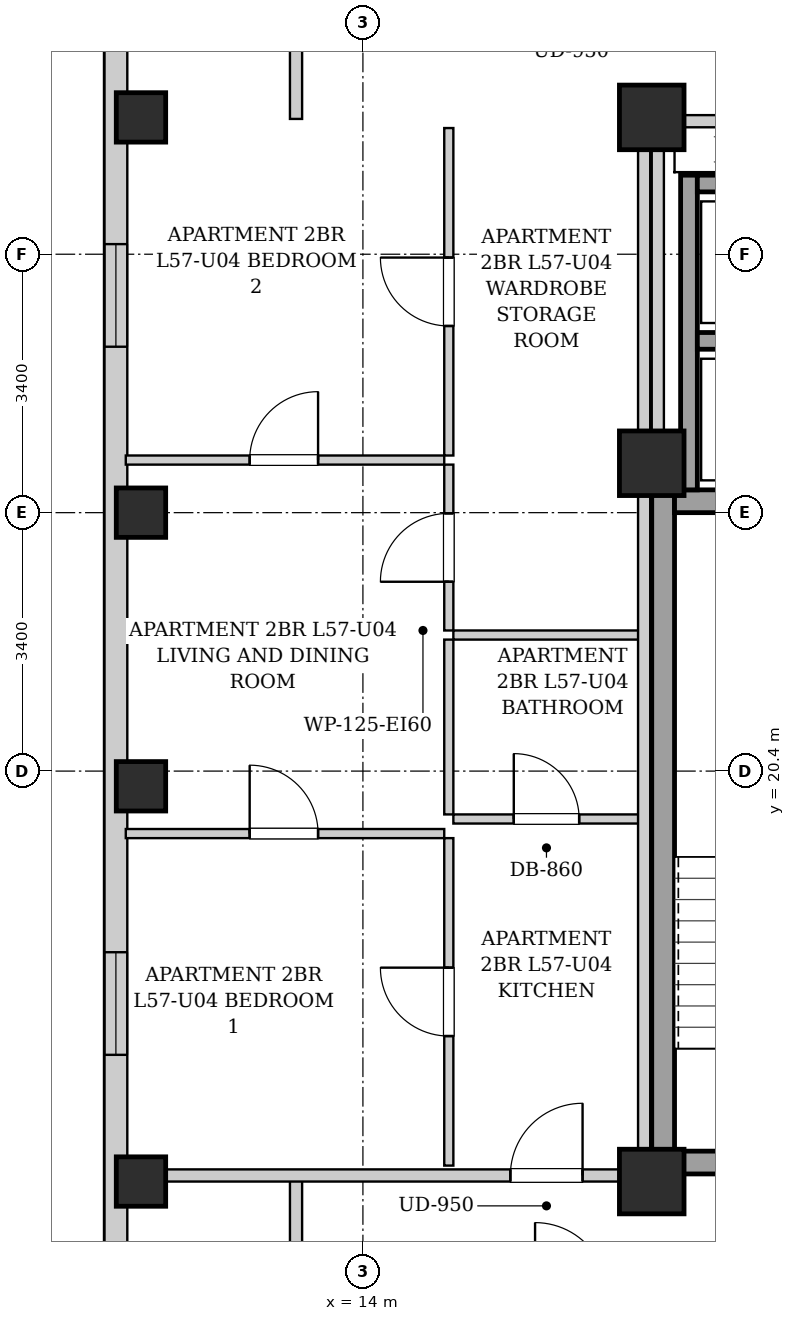
"""IFC4 building model, lengths in metres.
Left out: names, types, materials, properties, quantities, classifications, styles, units other than length and angle.
Written with IfcOpenShell. Run it as: python <this file> out.ifc"""

import sys

from ifc_helpers import new_model, si_unit, direction, frame, frame_2d, origin, origin_2d, place, context, subcontext, project, spatial, rectangle, extrude, element, fill, save


model = new_model("IFC4")
c1 = context("Model", 3, precision=1e-05, world=origin(), true_north=direction((0.0, 1.0)))
c2 = subcontext(c1, "Body", "Model", "MODEL_VIEW")
j1 = project(units=[si_unit("LENGTHUNIT", "METRE"), si_unit("PLANEANGLEUNIT", "RADIAN")], contexts=[c1])
p1 = place(None, origin())
s1 = spatial("IfcSite", under=j1, at=p1, CompositionType="ELEMENT")
p2 = place(p1, origin())
s2 = spatial("IfcBuilding", under=s1, at=p2, CompositionType="ELEMENT")
p3 = place(p2, frame((0.0, 0.0, 197.5)))
s3 = spatial("IfcBuildingStorey", under=s2, at=p3, CompositionType="ELEMENT", Elevation=197.5)
for number, where, z_axis, x_axis in (
    (1, (11.08, 15.0, 0.0), (0.0, 0.0, 1.0), (1.0, 0.0, 0.0)),
    (2, (11.08, 20.2, 0.0), (0.0, 0.0, 1.0), (1.0, 0.0, 0.0)),
    (3, (11.08, 23.8, 0.0), (0.0, 0.0, 1.0), (1.0, 0.0, 0.0)),
    (4, (11.08, 29.0, 0.0), (0.0, 0.0, 1.0), (1.0, 0.0, 0.0)),
):
    element("IfcColumn", number, at=place(p3, frame(where, z_axis=z_axis, x_axis=x_axis)), inside=s3, PredefinedType="COLUMN", context=c2, shape_type="SweptSolid", body=[
        extrude(rectangle(XDim=0.65, YDim=0.65, at=origin_2d()), origin(), (0.0, 0.0, 1.0), 3.3),
    ])
for number, where, z_axis, x_axis in (
    (5, (17.8, 15.0, 0.0), (0.0, 0.0, 1.0), (1.0, 0.0, 0.0)),
    (6, (17.8, 29.0, 0.0), (0.0, 0.0, 1.0), (1.0, 0.0, 0.0)),
    (7, (17.8, 24.45, 0.0), (0.0, 0.0, 1.0), (1.0, 0.0, 0.0)),
):
    element("IfcColumn", number, at=place(p3, frame(where, z_axis=z_axis, x_axis=x_axis)), inside=s3, PredefinedType="COLUMN", context=c2, shape_type="SweptSolid", body=[
        extrude(rectangle(XDim=0.85, YDim=0.85, at=origin_2d()), origin(), (0.0, 0.0, 1.0), 3.3),
    ])
p4 = place(p3, frame((10.75, 6.3, 0.0), z_axis=(0.0, 0.0, 1.0), x_axis=(0.0, 1.0, 0.0)))
e8 = element("IfcWall", 8, at=p4, inside=s3, PredefinedType="SOLIDWALL", context=c2, shape_type="SweptSolid", body=[
    extrude(rectangle(XDim=31.4, YDim=0.3, at=frame_2d((15.7, 0.0))), origin(), (0.0, 0.0, 1.0), 3.04),
])
p5 = place(p4, frame((1.653, 0.0, 0.55)))
e9 = element("IfcOpeningElement", 9, at=p5, cuts=e8, PredefinedType="OPENING", context=c2, shape_type="SweptSolid", body=[
    extrude(rectangle(XDim=1.35, YDim=1.2, at=frame_2d((0.675, 0.6))), frame((0.0, 0.16, 0.0), z_axis=(0.0, -1.0, 0.0), x_axis=(1.0, 0.0, 0.0)), (0.0, 0.0, 1.0), 0.32),
])
p6 = place(p4, frame((28.396, 0.0, 0.55)))
e10 = element("IfcOpeningElement", 10, at=p6, cuts=e8, PredefinedType="OPENING", context=c2, shape_type="SweptSolid", body=[
    extrude(rectangle(XDim=1.35, YDim=1.2, at=frame_2d((0.675, 0.6))), frame((0.0, 0.16, 0.0), z_axis=(0.0, -1.0, 0.0), x_axis=(1.0, 0.0, 0.0)), (0.0, 0.0, 1.0), 0.32),
])
p7 = place(p4, frame((10.367, 0.0, 0.55)))
e11 = element("IfcOpeningElement", 11, at=p7, cuts=e8, PredefinedType="OPENING", context=c2, shape_type="SweptSolid", body=[
    extrude(rectangle(XDim=1.35, YDim=1.2, at=frame_2d((0.675, 0.6))), frame((0.0, 0.16, 0.0), z_axis=(0.0, -1.0, 0.0), x_axis=(1.0, 0.0, 0.0)), (0.0, 0.0, 1.0), 0.32),
])
p8 = place(p4, frame((19.683, 0.0, 0.55)))
e12 = element("IfcOpeningElement", 12, at=p8, cuts=e8, PredefinedType="OPENING", context=c2, shape_type="SweptSolid", body=[
    extrude(rectangle(XDim=1.35, YDim=1.2, at=frame_2d((0.675, 0.6))), frame((0.0, 0.16, 0.0), z_axis=(0.0, -1.0, 0.0), x_axis=(1.0, 0.0, 0.0)), (0.0, 0.0, 1.0), 0.32),
])
p9 = place(p3, frame((17.95, 15.1, 0.0), z_axis=(0.0, 0.0, 1.0), x_axis=(0.0, 1.0, 0.0)))
e13 = element("IfcWall", 13, at=p9, inside=s3, PredefinedType="SHEAR", context=c2, shape_type="SweptSolid", body=[
    extrude(rectangle(XDim=9.0, YDim=0.3, at=frame_2d((4.5, 0.0))), origin(), (0.0, 0.0, 1.0), 3.04),
])
p10 = place(p3, frame((18.1, 23.95, 0.0), z_axis=(0.0, 0.0, 1.0), x_axis=(1.0, 0.0, 0.0)))
e14 = element("IfcWall", 14, at=p10, inside=s3, PredefinedType="SHEAR", context=c2, shape_type="SweptSolid", body=[
    extrude(rectangle(XDim=2.85, YDim=0.3, at=frame_2d((1.425, 0.0))), origin(), (0.0, 0.0, 1.0), 3.04),
])
p11 = place(p3, frame((18.1, 15.25, 0.0), z_axis=(0.0, 0.0, 1.0), x_axis=(1.0, 0.0, 0.0)))
e15 = element("IfcWall", 15, at=p11, inside=s3, PredefinedType="SHEAR", context=c2, shape_type="SweptSolid", body=[
    extrude(rectangle(XDim=2.85, YDim=0.3, at=frame_2d((1.425, 0.0))), origin(), (0.0, 0.0, 1.0), 3.04),
])
p12 = place(p11, frame((0.86, 0.0, 0.0)))
e16 = element("IfcOpeningElement", 16, at=p12, cuts=e15, PredefinedType="OPENING", context=c2, shape_type="SweptSolid", body=[
    extrude(rectangle(XDim=1.1, YDim=2.05, at=frame_2d((0.55, 1.025))), frame((0.0, 0.16, 0.0), z_axis=(0.0, -1.0, 0.0), x_axis=(1.0, 0.0, 0.0)), (0.0, 0.0, 1.0), 0.32),
])
p13 = place(p3, frame((18.29, 24.1, 0.0), z_axis=(0.0, 0.0, 1.0), x_axis=(0.0, 1.0, 0.0)))
e17 = element("IfcWall", 17, at=p13, inside=s3, PredefinedType="SHEAR", context=c2, shape_type="SweptSolid", body=[
    extrude(rectangle(XDim=4.14, YDim=0.22, at=frame_2d((2.07, 0.0))), origin(), (0.0, 0.0, 1.0), 3.04),
])
for number, where, z_axis, x_axis in (
    (18, (18.4, 26.06, 0.0), (0.0, 0.0, 1.0), (1.0, 0.0, 0.0)),
    (19, (18.4, 28.13, 0.0), (0.0, 0.0, 1.0), (1.0, 0.0, 0.0)),
):
    element("IfcWall", number, at=place(p3, frame(where, z_axis=z_axis, x_axis=x_axis)), inside=s3, PredefinedType="SHEAR", context=c2, shape_type="SweptSolid", body=[
        extrude(rectangle(XDim=1.9, YDim=0.22, at=frame_2d((0.95, 0.0))), origin(), (0.0, 0.0, 1.0), 3.04),
    ])
p14 = place(p3, frame((17.88, 24.12, 0.0), z_axis=(0.0, 0.0, 1.0), x_axis=(0.0, 1.0, 0.0)))
e20 = element("IfcWall", 20, at=p14, inside=s3, PredefinedType="PARTITIONING", context=c2, shape_type="SweptSolid", body=[
    extrude(rectangle(XDim=4.76, YDim=0.16, at=frame_2d((2.38, 0.0))), origin(), (0.0, 0.0, 1.0), 2.375),
])
p15 = place(p3, frame((17.96, 28.95, 0.0), z_axis=(0.0, 0.0, 1.0), x_axis=(1.0, 0.0, 0.0)))
e21 = element("IfcWall", 21, at=p15, inside=s3, PredefinedType="PARTITIONING", context=c2, shape_type="SweptSolid", body=[
    extrude(rectangle(XDim=4.29, YDim=0.16, at=frame_2d((2.145, 0.0))), origin(), (0.0, 0.0, 1.0), 2.556),
])
p16 = place(p15, frame((1.715, 0.0, 0.0)))
e22 = element("IfcOpeningElement", 22, at=p16, cuts=e21, PredefinedType="OPENING", context=c2, shape_type="SweptSolid", body=[
    extrude(rectangle(XDim=0.86, YDim=2.05, at=frame_2d((0.43, 1.025))), frame((0.0, 0.09, 0.0), z_axis=(0.0, -1.0, 0.0), x_axis=(1.0, 0.0, 0.0)), (0.0, 0.0, 1.0), 0.18),
])
for number, where, z_axis, x_axis in (
    (23, (13.12, 13.51, 0.0), (0.0, 0.0, 1.0), (0.0, 1.0, 0.0)),
    (24, (13.12, 28.98, 0.0), (0.0, 0.0, 1.0), (0.0, 1.0, 0.0)),
):
    element("IfcWall", number, at=place(p3, frame(where, z_axis=z_axis, x_axis=x_axis)), inside=s3, PredefinedType="PARTITIONING", context=c2, shape_type="SweptSolid", body=[
        extrude(rectangle(XDim=1.58, YDim=0.16, at=frame_2d((0.79, 0.0))), origin(), (0.0, 0.0, 1.0), 3.04),
    ])
p17 = place(p3, frame((10.88, 15.08, 0.0), z_axis=(0.0, 0.0, 1.0), x_axis=(1.0, 0.0, 0.0)))
e25 = element("IfcWall", 25, at=p17, inside=s3, PredefinedType="PARTITIONING", context=c2, shape_type="SweptSolid", body=[
    extrude(rectangle(XDim=6.88, YDim=0.16, at=frame_2d((3.44, 0.0))), origin(), (0.0, 0.0, 1.0), 2.556),
])
p18 = place(p17, frame((5.06, 0.0, 0.0)))
e26 = element("IfcOpeningElement", 26, at=p18, cuts=e25, PredefinedType="OPENING", context=c2, shape_type="SweptSolid", body=[
    extrude(rectangle(XDim=0.95, YDim=2.1, at=frame_2d((0.475, 1.05))), frame((0.0, 0.09, 0.0), z_axis=(0.0, -1.0, 0.0), x_axis=(1.0, 0.0, 0.0)), (0.0, 0.0, 1.0), 0.18),
])
p19 = place(p3, frame((15.19, 22.19, 0.0), z_axis=(0.0, 0.0, 1.0), x_axis=(1.0, 0.0, 0.0)))
e27 = element("IfcWall", 27, at=p19, inside=s3, PredefinedType="PARTITIONING", context=c2, shape_type="SweptSolid", body=[
    extrude(rectangle(XDim=2.45, YDim=0.12, at=frame_2d((1.225, 0.0))), origin(), (0.0, 0.0, 1.0), 3.04),
])
p20 = place(p3, frame((15.13, 22.25, 0.0), z_axis=(0.0, 0.0, 1.0), x_axis=(0.0, 1.0, 0.0)))
e28 = element("IfcWall", 28, at=p20, inside=s3, PredefinedType="PARTITIONING", context=c2, shape_type="SweptSolid", body=[
    extrude(rectangle(XDim=2.182, YDim=0.12, at=frame_2d((1.091, 0.0))), origin(), (0.0, 0.0, 1.0), 3.04),
])
p21 = place(p20, frame((0.641, 0.0, 0.0)))
e29 = element("IfcOpeningElement", 29, at=p21, cuts=e28, PredefinedType="OPENING", context=c2, shape_type="SweptSolid", body=[
    extrude(rectangle(XDim=0.9, YDim=2.05, at=frame_2d((0.45, 1.025))), frame((0.0, 0.07, 0.0), z_axis=(0.0, -1.0, 0.0), x_axis=(1.0, 0.0, 0.0)), (0.0, 0.0, 1.0), 0.14),
])
p22 = place(p3, frame((15.13, 24.552, 0.0), z_axis=(0.0, 0.0, 1.0), x_axis=(0.0, 1.0, 0.0)))
e30 = element("IfcWall", 30, at=p22, inside=s3, PredefinedType="PARTITIONING", context=c2, shape_type="SweptSolid", body=[
    extrude(rectangle(XDim=4.308, YDim=0.12, at=frame_2d((2.154, 0.0))), origin(), (0.0, 0.0, 1.0), 3.04),
])
p23 = place(p22, frame((1.704, 0.0, 0.0)))
e31 = element("IfcOpeningElement", 31, at=p23, cuts=e30, PredefinedType="OPENING", context=c2, shape_type="SweptSolid", body=[
    extrude(rectangle(XDim=0.9, YDim=2.05, at=frame_2d((0.45, 1.025))), frame((0.0, 0.07, 0.0), z_axis=(0.0, -1.0, 0.0), x_axis=(1.0, 0.0, 0.0)), (0.0, 0.0, 1.0), 0.14),
])
p24 = place(p3, frame((15.19, 19.77, 0.0), z_axis=(0.0, 0.0, 1.0), x_axis=(1.0, 0.0, 0.0)))
e32 = element("IfcWall", 32, at=p24, inside=s3, PredefinedType="PARTITIONING", context=c2, shape_type="SweptSolid", body=[
    extrude(rectangle(XDim=2.45, YDim=0.12, at=frame_2d((1.225, 0.0))), origin(), (0.0, 0.0, 1.0), 3.04),
])
p25 = place(p24, frame((0.795, 0.0, 0.0)))
e33 = element("IfcOpeningElement", 33, at=p25, cuts=e32, PredefinedType="OPENING", context=c2, shape_type="SweptSolid", body=[
    extrude(rectangle(XDim=0.86, YDim=2.05, at=frame_2d((0.43, 1.025))), frame((0.0, 0.07, 0.0), z_axis=(0.0, -1.0, 0.0), x_axis=(1.0, 0.0, 0.0)), (0.0, 0.0, 1.0), 0.14),
])
p26 = place(p3, frame((15.13, 19.83, 0.0), z_axis=(0.0, 0.0, 1.0), x_axis=(0.0, 1.0, 0.0)))
e34 = element("IfcWall", 34, at=p26, inside=s3, PredefinedType="PARTITIONING", context=c2, shape_type="SweptSolid", body=[
    extrude(rectangle(XDim=2.3, YDim=0.12, at=frame_2d((1.15, 0.0))), origin(), (0.0, 0.0, 1.0), 3.04),
])
p27 = place(p3, frame((15.13, 15.21, 0.0), z_axis=(0.0, 0.0, 1.0), x_axis=(0.0, 1.0, 0.0)))
e35 = element("IfcWall", 35, at=p27, inside=s3, PredefinedType="PARTITIONING", context=c2, shape_type="SweptSolid", body=[
    extrude(rectangle(XDim=4.308, YDim=0.12, at=frame_2d((2.154, 0.0))), origin(), (0.0, 0.0, 1.0), 3.04),
])
p28 = place(p27, frame((1.704, 0.0, 0.0)))
e36 = element("IfcOpeningElement", 36, at=p28, cuts=e35, PredefinedType="OPENING", context=c2, shape_type="SweptSolid", body=[
    extrude(rectangle(XDim=0.9, YDim=2.05, at=frame_2d((0.45, 1.025))), frame((0.0, 0.07, 0.0), z_axis=(0.0, -1.0, 0.0), x_axis=(1.0, 0.0, 0.0)), (0.0, 0.0, 1.0), 0.14),
])
p29 = place(p3, frame((10.88, 19.578, 0.0), z_axis=(0.0, 0.0, 1.0), x_axis=(1.0, 0.0, 0.0)))
e37 = element("IfcWall", 37, at=p29, inside=s3, PredefinedType="PARTITIONING", context=c2, shape_type="SweptSolid", body=[
    extrude(rectangle(XDim=4.19, YDim=0.12, at=frame_2d((2.095, 0.0))), origin(), (0.0, 0.0, 1.0), 3.04),
])
p30 = place(p29, frame((1.63, 0.0, 0.0)))
e38 = element("IfcOpeningElement", 38, at=p30, cuts=e37, PredefinedType="OPENING", context=c2, shape_type="SweptSolid", body=[
    extrude(rectangle(XDim=0.9, YDim=2.05, at=frame_2d((0.45, 1.025))), frame((0.0, 0.07, 0.0), z_axis=(0.0, -1.0, 0.0), x_axis=(1.0, 0.0, 0.0)), (0.0, 0.0, 1.0), 0.14),
])
p31 = place(p3, frame((10.88, 24.492, 0.0), z_axis=(0.0, 0.0, 1.0), x_axis=(1.0, 0.0, 0.0)))
e39 = element("IfcWall", 39, at=p31, inside=s3, PredefinedType="PARTITIONING", context=c2, shape_type="SweptSolid", body=[
    extrude(rectangle(XDim=4.19, YDim=0.12, at=frame_2d((2.095, 0.0))), origin(), (0.0, 0.0, 1.0), 2.722),
])
p32 = place(p31, frame((1.63, 0.0, 0.0)))
e40 = element("IfcOpeningElement", 40, at=p32, cuts=e39, PredefinedType="OPENING", context=c2, shape_type="SweptSolid", body=[
    extrude(rectangle(XDim=0.9, YDim=2.05, at=frame_2d((0.45, 1.025))), frame((0.0, 0.07, 0.0), z_axis=(0.0, -1.0, 0.0), x_axis=(1.0, 0.0, 0.0)), (0.0, 0.0, 1.0), 0.14),
])
p33 = place(p3, frame((17.7, 15.02, 0.0), z_axis=(0.0, 0.0, 1.0), x_axis=(0.0, 1.0, 0.0)))
e41 = element("IfcWall", 41, at=p33, inside=s3, PredefinedType="PARTITIONING", context=c2, shape_type="SweptSolid", body=[
    extrude(rectangle(XDim=13.98, YDim=0.16, at=frame_2d((6.99, 0.0))), origin(), (0.0, 0.0, 1.0), 2.375),
])
p34 = place(p18, origin())
e42 = element("IfcDoor", 42, at=p34, inside=s3, OperationType="SINGLE_SWING_RIGHT", PredefinedType="DOOR", context=c2, shape_type="SweptSolid", body=[
    extrude(rectangle(XDim=0.95, YDim=2.1, at=frame_2d((0.475, 1.05))), frame((0.0, 0.025, 0.0), z_axis=(0.0, -1.0, 0.0), x_axis=(1.0, 0.0, 0.0)), (0.0, 0.0, 1.0), 0.05),
])
fill(e26, e42)
p35 = place(p21, origin())
e43 = element("IfcDoor", 43, at=p35, inside=s3, OperationType="SINGLE_SWING_LEFT", PredefinedType="DOOR", context=c2, shape_type="SweptSolid", body=[
    extrude(rectangle(XDim=0.9, YDim=2.05, at=frame_2d((0.45, 1.025))), frame((0.0, 0.025, 0.0), z_axis=(0.0, -1.0, 0.0), x_axis=(1.0, 0.0, 0.0)), (0.0, 0.0, 1.0), 0.05),
])
fill(e29, e43)
p36 = place(p23, origin())
e44 = element("IfcDoor", 44, at=p36, inside=s3, OperationType="SINGLE_SWING_RIGHT", PredefinedType="DOOR", context=c2, shape_type="SweptSolid", body=[
    extrude(rectangle(XDim=0.9, YDim=2.05, at=frame_2d((0.45, 1.025))), frame((0.0, 0.025, 0.0), z_axis=(0.0, -1.0, 0.0), x_axis=(1.0, 0.0, 0.0)), (0.0, 0.0, 1.0), 0.05),
])
fill(e31, e44)
p37 = place(p25, origin())
e45 = element("IfcDoor", 45, at=p37, inside=s3, OperationType="SINGLE_SWING_LEFT", PredefinedType="DOOR", context=c2, shape_type="SweptSolid", body=[
    extrude(rectangle(XDim=0.86, YDim=2.05, at=frame_2d((0.43, 1.025))), frame((0.0, 0.025, 0.0), z_axis=(0.0, -1.0, 0.0), x_axis=(1.0, 0.0, 0.0)), (0.0, 0.0, 1.0), 0.05),
])
fill(e33, e45)
p38 = place(p28, origin())
e46 = element("IfcDoor", 46, at=p38, inside=s3, OperationType="SINGLE_SWING_RIGHT", PredefinedType="DOOR", context=c2, shape_type="SweptSolid", body=[
    extrude(rectangle(XDim=0.9, YDim=2.05, at=frame_2d((0.45, 1.025))), frame((0.0, 0.025, 0.0), z_axis=(0.0, -1.0, 0.0), x_axis=(1.0, 0.0, 0.0)), (0.0, 0.0, 1.0), 0.05),
])
fill(e36, e46)
p39 = place(p30, origin())
e47 = element("IfcDoor", 47, at=p39, inside=s3, OperationType="SINGLE_SWING_LEFT", PredefinedType="DOOR", context=c2, shape_type="SweptSolid", body=[
    extrude(rectangle(XDim=0.9, YDim=2.05, at=frame_2d((0.45, 1.025))), frame((0.0, 0.025, 0.0), z_axis=(0.0, -1.0, 0.0), x_axis=(1.0, 0.0, 0.0)), (0.0, 0.0, 1.0), 0.05),
])
fill(e38, e47)
p40 = place(p32, origin())
e48 = element("IfcDoor", 48, at=p40, inside=s3, OperationType="SINGLE_SWING_RIGHT", PredefinedType="DOOR", context=c2, shape_type="SweptSolid", body=[
    extrude(rectangle(XDim=0.9, YDim=2.05, at=frame_2d((0.45, 1.025))), frame((0.0, 0.025, 0.0), z_axis=(0.0, -1.0, 0.0), x_axis=(1.0, 0.0, 0.0)), (0.0, 0.0, 1.0), 0.05),
])
fill(e40, e48)
p41 = place(p7, origin())
e49 = element("IfcWindow", 49, at=p41, inside=s3, PartitioningType="SINGLE_PANEL", PredefinedType="WINDOW", context=c2, shape_type="SweptSolid", body=[
    extrude(rectangle(XDim=1.35, YDim=1.2, at=frame_2d((0.675, 0.6))), frame((0.0, 0.03, 0.0), z_axis=(0.0, -1.0, 0.0), x_axis=(1.0, 0.0, 0.0)), (0.0, 0.0, 1.0), 0.06),
])
fill(e11, e49)
p42 = place(p8, origin())
e50 = element("IfcWindow", 50, at=p42, inside=s3, PartitioningType="SINGLE_PANEL", PredefinedType="WINDOW", context=c2, shape_type="SweptSolid", body=[
    extrude(rectangle(XDim=1.35, YDim=1.2, at=frame_2d((0.675, 0.6))), frame((0.0, 0.03, 0.0), z_axis=(0.0, -1.0, 0.0), x_axis=(1.0, 0.0, 0.0)), (0.0, 0.0, 1.0), 0.06),
])
fill(e12, e50)
save(model, sys.argv[1])
